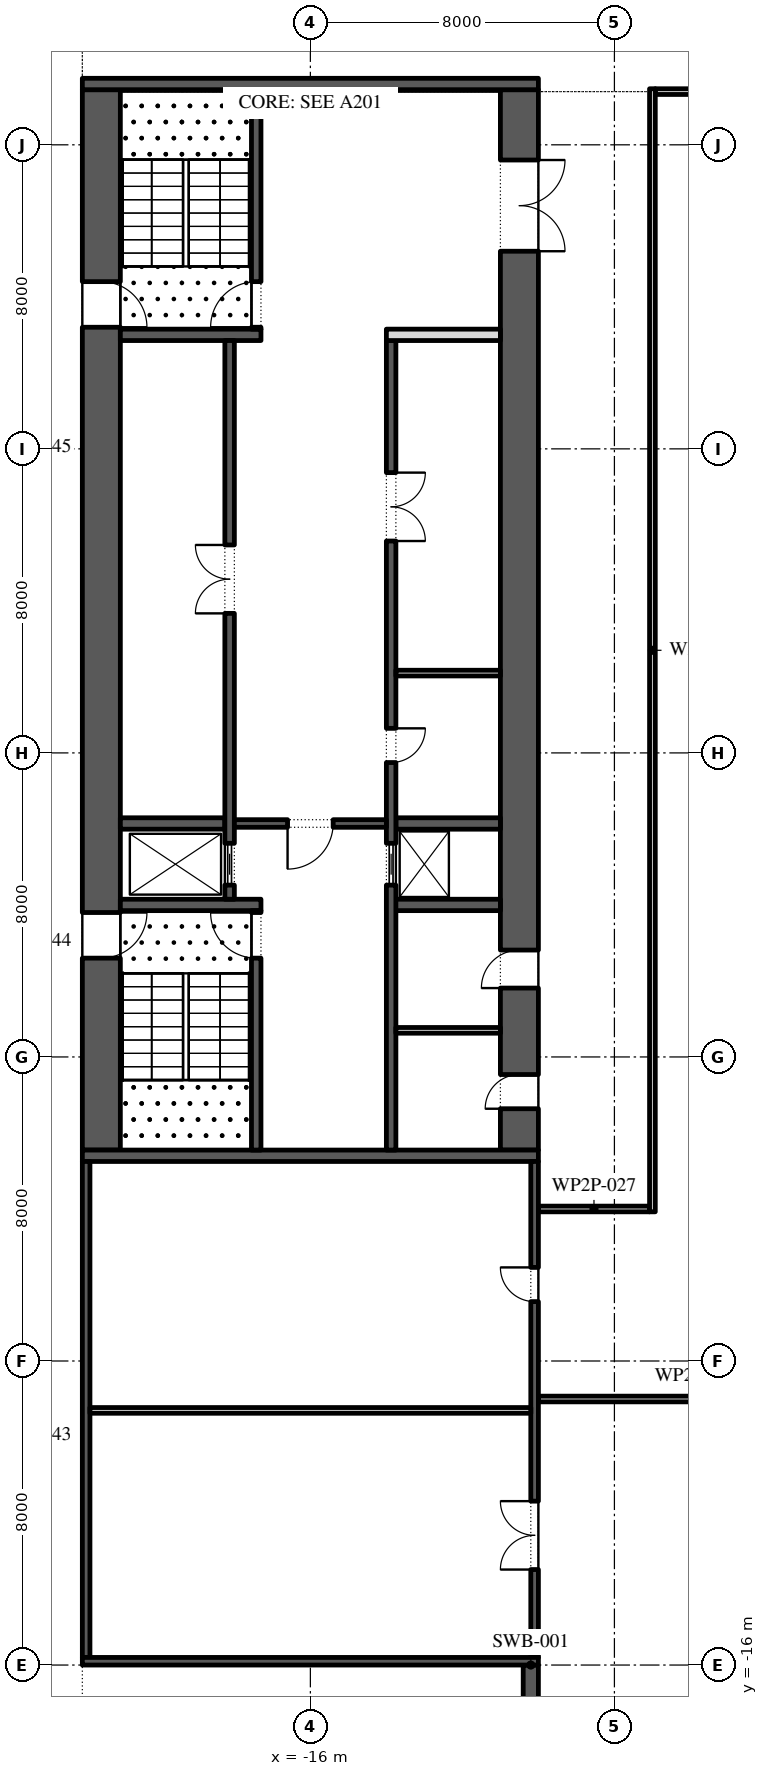
"""IFC4 building model, lengths in metres.
Left out: names, types, materials, properties, quantities, classifications, styles, units other than length and angle.
Written with IfcOpenShell. Run it as: python <this file> out.ifc"""

import sys

from ifc_helpers import new_model, si_unit, direction, frame, frame_2d, origin, place, context, subcontext, project, spatial, rectangle, extrude, element, fill, save


model = new_model("IFC4")
c1 = context("Model", 3, precision=1e-05, world=origin(), true_north=direction((0.0, 1.0)))
c2 = subcontext(c1, "Body", "Model", "MODEL_VIEW")
j1 = project(units=[si_unit("LENGTHUNIT", "METRE"), si_unit("PLANEANGLEUNIT", "RADIAN")], contexts=[c1])
p1 = place(None, origin())
s1 = spatial("IfcSite", under=j1, at=p1, CompositionType="ELEMENT")
p2 = place(p1, origin())
s2 = spatial("IfcBuilding", under=s1, at=p2, CompositionType="ELEMENT")
p3 = place(p2, frame((0.0, 0.0, -10.4)))
s3 = spatial("IfcBuildingStorey", under=s2, at=p3, CompositionType="ELEMENT", Elevation=-10.4)
p4 = place(p3, frame((-10.2, -31.0, -0.3), z_axis=(0.0, 0.0, 1.0), x_axis=(0.0, 1.0, 0.0)))
e1 = element("IfcWall", 1, at=p4, inside=s3, PredefinedType="SHEAR", context=c2, shape_type="SweptSolid", body=[
    extrude(rectangle(XDim=15.0, YDim=0.4, at=frame_2d((7.5, 0.0))), origin(), (0.0, 0.0, 1.0), 5.2),
])
p5 = place(p3, frame((-21.5, -2.45, 0.0), z_axis=(0.0, 0.0, 1.0), x_axis=(0.0, 1.0, 0.0)))
e2 = element("IfcWall", 2, at=p5, inside=s3, PredefinedType="SHEAR", context=c2, shape_type="SweptSolid", body=[
    extrude(rectangle(XDim=27.9, YDim=1.0, at=frame_2d((13.95, 0.0))), origin(), (0.0, 0.0, 1.0), 4.9),
])
p6 = place(p5, frame((5.05, 0.0, 0.0)))
e3 = element("IfcOpeningElement", 3, at=p6, cuts=e2, PredefinedType="OPENING", context=c2, shape_type="SweptSolid", body=[
    extrude(rectangle(XDim=1.2, YDim=2.1, at=frame_2d((0.6, 1.05))), frame((0.0, 0.51, 0.0), z_axis=(0.0, -1.0, 0.0), x_axis=(1.0, 0.0, 0.0)), (0.0, 0.0, 1.0), 1.02),
])
p7 = place(p5, frame((21.65, 0.0, 0.0)))
e4 = element("IfcOpeningElement", 4, at=p7, cuts=e2, PredefinedType="OPENING", context=c2, shape_type="SweptSolid", body=[
    extrude(rectangle(XDim=1.2, YDim=2.1, at=frame_2d((0.6, 1.05))), frame((0.0, 0.51, 0.0), z_axis=(0.0, -1.0, 0.0), x_axis=(1.0, 0.0, 0.0)), (0.0, 0.0, 1.0), 1.02),
])
p8 = place(p3, frame((-10.5, -2.45, 0.0), z_axis=(0.0, 0.0, 1.0), x_axis=(0.0, 1.0, 0.0)))
e5 = element("IfcWall", 5, at=p8, inside=s3, PredefinedType="SHEAR", context=c2, shape_type="SweptSolid", body=[
    extrude(rectangle(XDim=27.9, YDim=1.0, at=frame_2d((13.95, 0.0))), origin(), (0.0, 0.0, 1.0), 4.9),
])
p9 = place(p8, frame((23.65, 0.0, 0.0)))
e6 = element("IfcOpeningElement", 6, at=p9, cuts=e5, PredefinedType="OPENING", context=c2, shape_type="SweptSolid", body=[
    extrude(rectangle(XDim=2.4, YDim=2.1, at=frame_2d((1.2, 1.05))), frame((0.0, 0.51, 0.0), z_axis=(0.0, -1.0, 0.0), x_axis=(1.0, 0.0, 0.0)), (0.0, 0.0, 1.0), 1.02),
])
p10 = place(p8, frame((1.087, 0.0, 0.0)))
e7 = element("IfcOpeningElement", 7, at=p10, cuts=e5, PredefinedType="OPENING", context=c2, shape_type="SweptSolid", body=[
    extrude(rectangle(XDim=0.9, YDim=2.1, at=frame_2d((0.45, 1.05))), frame((0.0, 0.51, 0.0), z_axis=(0.0, -1.0, 0.0), x_axis=(1.0, 0.0, 0.0)), (0.0, 0.0, 1.0), 1.02),
])
p11 = place(p8, frame((4.262, 0.0, 0.0)))
e8 = element("IfcOpeningElement", 8, at=p11, cuts=e5, PredefinedType="OPENING", context=c2, shape_type="SweptSolid", body=[
    extrude(rectangle(XDim=1.0, YDim=2.1, at=frame_2d((0.5, 1.05))), frame((0.0, 0.51, 0.0), z_axis=(0.0, -1.0, 0.0), x_axis=(1.0, 0.0, 0.0)), (0.0, 0.0, 1.0), 1.02),
])
for number, where, z_axis, x_axis in (
    (9, (-22.0, -2.6, 0.0), (0.0, 0.0, 1.0), (1.0, 0.0, 0.0)),
    (10, (-22.0, 25.6, 0.0), (0.0, 0.0, 1.0), (1.0, 0.0, 0.0)),
):
    element("IfcWall", number, at=place(p3, frame(where, z_axis=z_axis, x_axis=x_axis)), inside=s3, PredefinedType="SHEAR", context=c2, shape_type="SweptSolid", body=[
        extrude(rectangle(XDim=12.0, YDim=0.3, at=frame_2d((6.0, 0.0))), origin(), (0.0, 0.0, 1.0), 4.9),
    ])
p12 = place(p3, frame((-21.0, 4.0, 0.0), z_axis=(0.0, 0.0, 1.0), x_axis=(1.0, 0.0, 0.0)))
e11 = element("IfcWall", 11, at=p12, inside=s3, PredefinedType="SHEAR", context=c2, shape_type="SweptSolid", body=[
    extrude(rectangle(XDim=3.7, YDim=0.3, at=frame_2d((1.85, 0.0))), origin(), (0.0, 0.0, 1.0), 4.9),
])
p13 = place(p3, frame((-17.425, -2.45, 0.0), z_axis=(0.0, 0.0, 1.0), x_axis=(0.0, 1.0, 0.0)))
e12 = element("IfcWall", 12, at=p13, inside=s3, PredefinedType="SHEAR", context=c2, shape_type="SweptSolid", body=[
    extrude(rectangle(XDim=6.3, YDim=0.25, at=frame_2d((3.15, 0.0))), origin(), (0.0, 0.0, 1.0), 4.9),
])
p14 = place(p13, frame((5.05, 0.0, 0.0)))
e13 = element("IfcOpeningElement", 13, at=p14, cuts=e12, PredefinedType="OPENING", context=c2, shape_type="SweptSolid", body=[
    extrude(rectangle(XDim=1.2, YDim=2.1, at=frame_2d((0.6, 1.05))), frame((0.0, 0.135, 0.0), z_axis=(0.0, -1.0, 0.0), x_axis=(1.0, 0.0, 0.0)), (0.0, 0.0, 1.0), 0.27),
])
p15 = place(p3, frame((-21.0, 19.0, 0.0), z_axis=(0.0, 0.0, 1.0), x_axis=(1.0, 0.0, 0.0)))
e14 = element("IfcWall", 14, at=p15, inside=s3, PredefinedType="SHEAR", context=c2, shape_type="SweptSolid", body=[
    extrude(rectangle(XDim=3.7, YDim=0.3, at=frame_2d((1.85, 0.0))), origin(), (0.0, 0.0, 1.0), 4.9),
])
p16 = place(p3, frame((-17.425, 19.15, 0.0), z_axis=(0.0, 0.0, 1.0), x_axis=(0.0, 1.0, 0.0)))
e15 = element("IfcWall", 15, at=p16, inside=s3, PredefinedType="SHEAR", context=c2, shape_type="SweptSolid", body=[
    extrude(rectangle(XDim=6.3, YDim=0.25, at=frame_2d((3.15, 0.0))), origin(), (0.0, 0.0, 1.0), 4.9),
])
p17 = place(p16, frame((0.05, 0.0, 0.0)))
e16 = element("IfcOpeningElement", 16, at=p17, cuts=e15, PredefinedType="OPENING", context=c2, shape_type="SweptSolid", body=[
    extrude(rectangle(XDim=1.2, YDim=2.1, at=frame_2d((0.6, 1.05))), frame((0.0, 0.135, 0.0), z_axis=(0.0, -1.0, 0.0), x_axis=(1.0, 0.0, 0.0)), (0.0, 0.0, 1.0), 0.27),
])
p18 = place(p3, frame((-21.0, 6.143, 0.0), z_axis=(0.0, 0.0, 1.0), x_axis=(1.0, 0.0, 0.0)))
e17 = element("IfcWall", 17, at=p18, inside=s3, PredefinedType="SHEAR", context=c2, shape_type="SweptSolid", body=[
    extrude(rectangle(XDim=2.75, YDim=0.3, at=frame_2d((1.375, 0.0))), origin(), (0.0, 0.0, 1.0), 4.9),
])
p19 = place(p3, frame((-18.125, 4.15, 0.0), z_axis=(0.0, 0.0, 1.0), x_axis=(0.0, 1.0, 0.0)))
e18 = element("IfcWall", 18, at=p19, inside=s3, PredefinedType="SHEAR", context=c2, shape_type="SweptSolid", body=[
    extrude(rectangle(XDim=14.7, YDim=0.25, at=frame_2d((7.35, 0.0))), origin(), (0.0, 0.0, 1.0), 4.9),
])
p20 = place(p19, frame((7.521, 0.0, 0.0)))
e19 = element("IfcOpeningElement", 19, at=p20, cuts=e18, PredefinedType="OPENING", context=c2, shape_type="SweptSolid", body=[
    extrude(rectangle(XDim=1.8, YDim=2.4, at=frame_2d((0.9, 1.2))), frame((0.0, 0.135, 0.0), z_axis=(0.0, -1.0, 0.0), x_axis=(1.0, 0.0, 0.0)), (0.0, 0.0, 1.0), 0.27),
])
p21 = place(p19, frame((0.371, 0.0, 0.0)))
e20 = element("IfcOpeningElement", 20, at=p21, cuts=e18, PredefinedType="OPENING", context=c2, shape_type="SweptSolid", body=[
    extrude(rectangle(XDim=1.1, YDim=2.1, at=frame_2d((0.55, 1.05))), frame((0.0, 0.135, 0.0), z_axis=(0.0, -1.0, 0.0), x_axis=(1.0, 0.0, 0.0)), (0.0, 0.0, 1.0), 0.27),
])
p22 = place(p3, frame((-14.0, 4.0, 0.0), z_axis=(0.0, 0.0, 1.0), x_axis=(1.0, 0.0, 0.0)))
e21 = element("IfcWall", 21, at=p22, inside=s3, PredefinedType="SHEAR", context=c2, shape_type="SweptSolid", body=[
    extrude(rectangle(XDim=3.0, YDim=0.3, at=frame_2d((1.5, 0.0))), origin(), (0.0, 0.0, 1.0), 4.9),
])
p23 = place(p3, frame((-13.75, 6.143, 0.0), z_axis=(0.0, 0.0, 1.0), x_axis=(1.0, 0.0, 0.0)))
e22 = element("IfcWall", 22, at=p23, inside=s3, PredefinedType="SHEAR", context=c2, shape_type="SweptSolid", body=[
    extrude(rectangle(XDim=2.75, YDim=0.3, at=frame_2d((1.375, 0.0))), origin(), (0.0, 0.0, 1.0), 4.9),
])
p24 = place(p3, frame((-13.875, -2.45, 0.0), z_axis=(0.0, 0.0, 1.0), x_axis=(0.0, 1.0, 0.0)))
e23 = element("IfcWall", 23, at=p24, inside=s3, PredefinedType="SHEAR", context=c2, shape_type="SweptSolid", body=[
    extrude(rectangle(XDim=21.3, YDim=0.25, at=frame_2d((10.65, 0.0))), origin(), (0.0, 0.0, 1.0), 4.9),
])
p25 = place(p24, frame((10.196, 0.0, 0.0)))
e24 = element("IfcOpeningElement", 24, at=p25, cuts=e23, PredefinedType="OPENING", context=c2, shape_type="SweptSolid", body=[
    extrude(rectangle(XDim=0.9, YDim=2.1, at=frame_2d((0.45, 1.05))), frame((0.0, 0.135, 0.0), z_axis=(0.0, -1.0, 0.0), x_axis=(1.0, 0.0, 0.0)), (0.0, 0.0, 1.0), 0.27),
])
p26 = place(p24, frame((16.025, 0.0, 0.0)))
e25 = element("IfcOpeningElement", 25, at=p26, cuts=e23, PredefinedType="OPENING", context=c2, shape_type="SweptSolid", body=[
    extrude(rectangle(XDim=1.8, YDim=2.4, at=frame_2d((0.9, 1.2))), frame((0.0, 0.135, 0.0), z_axis=(0.0, -1.0, 0.0), x_axis=(1.0, 0.0, 0.0)), (0.0, 0.0, 1.0), 0.27),
])
p27 = place(p24, frame((6.971, 0.0, 0.0)))
e26 = element("IfcOpeningElement", 26, at=p27, cuts=e23, PredefinedType="OPENING", context=c2, shape_type="SweptSolid", body=[
    extrude(rectangle(XDim=1.1, YDim=2.1, at=frame_2d((0.55, 1.05))), frame((0.0, 0.135, 0.0), z_axis=(0.0, -1.0, 0.0), x_axis=(1.0, 0.0, 0.0)), (0.0, 0.0, 1.0), 0.27),
])
p28 = place(p3, frame((-14.0, 19.0, 0.0), z_axis=(0.0, 0.0, 1.0), x_axis=(1.0, 0.0, 0.0)))
e27 = element("IfcWall", 27, at=p28, inside=s3, PredefinedType="PARTITIONING", context=c2, shape_type="SweptSolid", body=[
    extrude(rectangle(XDim=3.0, YDim=0.3, at=frame_2d((1.5, 0.0))), origin(), (0.0, 0.0, 1.0), 4.9),
])
p29 = place(p3, frame((-13.75, 10.1, 0.0), z_axis=(0.0, 0.0, 1.0), x_axis=(1.0, 0.0, 0.0)))
e28 = element("IfcWall", 28, at=p29, inside=s3, PredefinedType="PARTITIONING", context=c2, shape_type="SweptSolid", body=[
    extrude(rectangle(XDim=2.75, YDim=0.15, at=frame_2d((1.375, 0.0))), origin(), (0.0, 0.0, 1.0), 4.9),
])
p30 = place(p3, frame((-18.0, 6.143, 0.0), z_axis=(0.0, 0.0, 1.0), x_axis=(1.0, 0.0, 0.0)))
e29 = element("IfcWall", 29, at=p30, inside=s3, PredefinedType="SHEAR", context=c2, shape_type="SweptSolid", body=[
    extrude(rectangle(XDim=4.0, YDim=0.2, at=frame_2d((2.0, 0.0))), origin(), (0.0, 0.0, 1.0), 4.9),
])
p31 = place(p30, frame((1.4, 0.0, 0.0)))
e30 = element("IfcOpeningElement", 30, at=p31, cuts=e29, PredefinedType="OPENING", context=c2, shape_type="SweptSolid", body=[
    extrude(rectangle(XDim=1.2, YDim=2.1, at=frame_2d((0.6, 1.05))), frame((0.0, 0.11, 0.0), z_axis=(0.0, -1.0, 0.0), x_axis=(1.0, 0.0, 0.0)), (0.0, 0.0, 1.0), 0.22),
])
p32 = place(p3, frame((-13.75, 0.7, 0.0), z_axis=(0.0, 0.0, 1.0), x_axis=(1.0, 0.0, 0.0)))
e31 = element("IfcWall", 31, at=p32, inside=s3, PredefinedType="PARTITIONING", context=c2, shape_type="SweptSolid", body=[
    extrude(rectangle(XDim=2.75, YDim=0.15, at=frame_2d((1.375, 0.0))), origin(), (0.0, 0.0, 1.0), 4.9),
])
p33 = place(p3, frame((-21.9, -15.8, 0.0), z_axis=(0.0, 0.0, 1.0), x_axis=(0.0, 1.0, 0.0)))
e32 = element("IfcWall", 32, at=p33, inside=s3, PredefinedType="SHEAR", context=c2, shape_type="SweptSolid", body=[
    extrude(rectangle(XDim=13.05, YDim=0.2, at=frame_2d((6.525, 0.0))), origin(), (0.0, 0.0, 1.0), 4.9),
])
p34 = place(p3, frame((-10.1, -15.8, 0.0), z_axis=(0.0, 0.0, 1.0), x_axis=(0.0, 1.0, 0.0)))
e33 = element("IfcWall", 33, at=p34, inside=s3, PredefinedType="SHEAR", context=c2, shape_type="SweptSolid", body=[
    extrude(rectangle(XDim=13.05, YDim=0.2, at=frame_2d((6.525, 0.0))), origin(), (0.0, 0.0, 1.0), 4.9),
])
p35 = place(p34, frame((2.312, 0.0, 0.0)))
e34 = element("IfcOpeningElement", 34, at=p35, cuts=e33, PredefinedType="OPENING", context=c2, shape_type="SweptSolid", body=[
    extrude(rectangle(XDim=1.8, YDim=2.4, at=frame_2d((0.9, 1.2))), frame((0.0, 0.11, 0.0), z_axis=(0.0, -1.0, 0.0), x_axis=(1.0, 0.0, 0.0)), (0.0, 0.0, 1.0), 0.22),
])
p36 = place(p34, frame((9.363, 0.0, 0.0)))
e35 = element("IfcOpeningElement", 35, at=p36, cuts=e33, PredefinedType="OPENING", context=c2, shape_type="SweptSolid", body=[
    extrude(rectangle(XDim=0.9, YDim=2.1, at=frame_2d((0.45, 1.05))), frame((0.0, 0.11, 0.0), z_axis=(0.0, -1.0, 0.0), x_axis=(1.0, 0.0, 0.0)), (0.0, 0.0, 1.0), 0.22),
])
p37 = place(p3, frame((-22.0, -15.9, 0.0), z_axis=(0.0, 0.0, 1.0), x_axis=(1.0, 0.0, 0.0)))
e36 = element("IfcWall", 36, at=p37, inside=s3, PredefinedType="SHEAR", context=c2, shape_type="SweptSolid", body=[
    extrude(rectangle(XDim=12.0, YDim=0.2, at=frame_2d((6.0, 0.0))), origin(), (0.0, 0.0, 1.0), 4.9),
])
p38 = place(p3, frame((-21.8, -9.3, 0.0), z_axis=(0.0, 0.0, 1.0), x_axis=(1.0, 0.0, 0.0)))
e37 = element("IfcWall", 37, at=p38, inside=s3, PredefinedType="PARTITIONING", context=c2, shape_type="SweptSolid", body=[
    extrude(rectangle(XDim=11.6, YDim=0.15, at=frame_2d((5.8, 0.0))), origin(), (0.0, 0.0, 1.0), 4.9),
])
p39 = place(p3, frame((-10.0, -9.0, 0.0), z_axis=(0.0, 0.0, 1.0), x_axis=(1.0, 0.0, 0.0)))
e38 = element("IfcWall", 38, at=p39, inside=s3, PredefinedType="PARTITIONING", context=c2, shape_type="SweptSolid", body=[
    extrude(rectangle(XDim=8.425, YDim=0.15, at=frame_2d((4.212, 0.0))), origin(), (0.0, 0.0, 1.0), 4.9),
])
p40 = place(p3, frame((-10.0, -4.0, 0.0), z_axis=(0.0, 0.0, 1.0), x_axis=(1.0, 0.0, 0.0)))
e39 = element("IfcWall", 39, at=p40, inside=s3, PredefinedType="PARTITIONING", context=c2, shape_type="SweptSolid", body=[
    extrude(rectangle(XDim=2.925, YDim=0.15, at=frame_2d((1.462, 0.0))), origin(), (0.0, 0.0, 1.0), 3.93),
])
p41 = place(p3, frame((-6.925, 25.4, 0.0), z_axis=(0.0, 0.0, 1.0), x_axis=(1.0, 0.0, 0.0)))
e40 = element("IfcWall", 40, at=p41, inside=s3, PredefinedType="PARTITIONING", context=c2, shape_type="SweptSolid", body=[
    extrude(rectangle(XDim=5.35, YDim=0.15, at=frame_2d((2.675, 0.0))), origin(), (0.0, 0.0, 1.0), 4.9),
])
p42 = place(p3, frame((-7.0, -4.075, 0.0), z_axis=(0.0, 0.0, 1.0), x_axis=(0.0, 1.0, 0.0)))
e41 = element("IfcWall", 41, at=p42, inside=s3, PredefinedType="PARTITIONING", context=c2, shape_type="SweptSolid", body=[
    extrude(rectangle(XDim=29.55, YDim=0.15, at=frame_2d((14.775, 0.0))), origin(), (0.0, 0.0, 1.0), 4.9),
])
p43 = place(p20, origin())
e42 = element("IfcDoor", 42, at=p43, inside=s3, OperationType="DOUBLE_DOOR_SINGLE_SWING", PredefinedType="DOOR", context=c2, shape_type="SweptSolid", body=[
    extrude(rectangle(XDim=1.8, YDim=2.4, at=frame_2d((0.9, 1.2))), frame((0.0, 0.125, 0.0), z_axis=(0.0, -1.0, 0.0), x_axis=(1.0, 0.0, 0.0)), (0.0, 0.0, 1.0), 0.05),
])
fill(e19, e42)
p44 = place(p21, origin())
e43 = element("IfcDoor", 43, at=p44, inside=s3, OperationType="SLIDING_TO_LEFT", PredefinedType="DOOR", context=c2, shape_type="SweptSolid", body=[
    extrude(rectangle(XDim=1.1, YDim=2.1, at=frame_2d((0.55, 1.05))), frame((0.0, 0.025, 0.0), z_axis=(0.0, -1.0, 0.0), x_axis=(1.0, 0.0, 0.0)), (0.0, 0.0, 1.0), 0.05),
])
fill(e20, e43)
p45 = place(p25, frame((0.9, -0.2, 0.0), z_axis=(0.0, 0.0, 1.0), x_axis=(-1.0, 0.0, 0.0)))
e44 = element("IfcDoor", 44, at=p45, inside=s3, OperationType="SINGLE_SWING_RIGHT", PredefinedType="DOOR", context=c2, shape_type="SweptSolid", body=[
    extrude(rectangle(XDim=0.9, YDim=2.1, at=frame_2d((0.45, 1.05))), frame((0.0, -0.075, 0.0), z_axis=(0.0, -1.0, 0.0), x_axis=(1.0, 0.0, 0.0)), (0.0, 0.0, 1.0), 0.05),
])
fill(e24, e44)
p46 = place(p26, frame((1.8, -0.2, 0.0), z_axis=(0.0, 0.0, 1.0), x_axis=(-1.0, 0.0, 0.0)))
e45 = element("IfcDoor", 45, at=p46, inside=s3, OperationType="DOUBLE_DOOR_SINGLE_SWING", PredefinedType="DOOR", context=c2, shape_type="SweptSolid", body=[
    extrude(rectangle(XDim=1.8, YDim=2.4, at=frame_2d((0.9, 1.2))), frame((0.0, -0.075, 0.0), z_axis=(0.0, -1.0, 0.0), x_axis=(1.0, 0.0, 0.0)), (0.0, 0.0, 1.0), 0.05),
])
fill(e25, e45)
p47 = place(p27, origin())
e46 = element("IfcDoor", 46, at=p47, inside=s3, OperationType="SLIDING_TO_LEFT", PredefinedType="DOOR", context=c2, shape_type="SweptSolid", body=[
    extrude(rectangle(XDim=1.1, YDim=2.1, at=frame_2d((0.55, 1.05))), frame((0.0, 0.025, 0.0), z_axis=(0.0, -1.0, 0.0), x_axis=(1.0, 0.0, 0.0)), (0.0, 0.0, 1.0), 0.05),
])
fill(e26, e46)
p48 = place(p31, frame((1.2, 0.0, 0.0), z_axis=(0.0, 0.0, 1.0), x_axis=(-1.0, 0.0, 0.0)))
e47 = element("IfcDoor", 47, at=p48, inside=s3, OperationType="SINGLE_SWING_LEFT", PredefinedType="DOOR", context=c2, shape_type="SweptSolid", body=[
    extrude(rectangle(XDim=1.2, YDim=2.1, at=frame_2d((0.6, 1.05))), frame((0.0, 0.025, 0.0), z_axis=(0.0, -1.0, 0.0), x_axis=(1.0, 0.0, 0.0)), (0.0, 0.0, 1.0), 0.05),
])
fill(e30, e47)
p49 = place(p9, frame((2.4, 0.0, 0.0), z_axis=(0.0, 0.0, 1.0), x_axis=(-1.0, 0.0, 0.0)))
e48 = element("IfcDoor", 48, at=p49, inside=s3, OperationType="DOUBLE_DOOR_SINGLE_SWING", PredefinedType="DOOR", context=c2, shape_type="SweptSolid", body=[
    extrude(rectangle(XDim=2.4, YDim=2.1, at=frame_2d((1.2, 1.05))), frame((0.0, 0.025, 0.0), z_axis=(0.0, -1.0, 0.0), x_axis=(1.0, 0.0, 0.0)), (0.0, 0.0, 1.0), 0.05),
])
fill(e6, e48)
p50 = place(p14, origin())
e49 = element("IfcDoor", 49, at=p50, inside=s3, OperationType="SINGLE_SWING_LEFT", PredefinedType="DOOR", context=c2, shape_type="SweptSolid", body=[
    extrude(rectangle(XDim=1.2, YDim=2.1, at=frame_2d((0.6, 1.05))), frame((0.0, 0.025, 0.0), z_axis=(0.0, -1.0, 0.0), x_axis=(1.0, 0.0, 0.0)), (0.0, 0.0, 1.0), 0.05),
])
fill(e13, e49)
p51 = place(p6, frame((1.2, 0.0, 0.0), z_axis=(0.0, 0.0, 1.0), x_axis=(-1.0, 0.0, 0.0)))
e50 = element("IfcDoor", 50, at=p51, inside=s3, OperationType="SINGLE_SWING_RIGHT", PredefinedType="DOOR", context=c2, shape_type="SweptSolid", body=[
    extrude(rectangle(XDim=1.2, YDim=2.1, at=frame_2d((0.6, 1.05))), frame((0.0, 0.025, 0.0), z_axis=(0.0, -1.0, 0.0), x_axis=(1.0, 0.0, 0.0)), (0.0, 0.0, 1.0), 0.05),
])
fill(e3, e50)
p52 = place(p17, origin())
e51 = element("IfcDoor", 51, at=p52, inside=s3, OperationType="SINGLE_SWING_RIGHT", PredefinedType="DOOR", context=c2, shape_type="SweptSolid", body=[
    extrude(rectangle(XDim=1.2, YDim=2.1, at=frame_2d((0.6, 1.05))), frame((0.0, 0.025, 0.0), z_axis=(0.0, -1.0, 0.0), x_axis=(1.0, 0.0, 0.0)), (0.0, 0.0, 1.0), 0.05),
])
fill(e16, e51)
p53 = place(p7, frame((1.2, 0.0, 0.0), z_axis=(0.0, 0.0, 1.0), x_axis=(-1.0, 0.0, 0.0)))
e52 = element("IfcDoor", 52, at=p53, inside=s3, OperationType="SINGLE_SWING_LEFT", PredefinedType="DOOR", context=c2, shape_type="SweptSolid", body=[
    extrude(rectangle(XDim=1.2, YDim=2.1, at=frame_2d((0.6, 1.05))), frame((0.0, 0.025, 0.0), z_axis=(0.0, -1.0, 0.0), x_axis=(1.0, 0.0, 0.0)), (0.0, 0.0, 1.0), 0.05),
])
fill(e4, e52)
p54 = place(p10, origin())
e53 = element("IfcDoor", 53, at=p54, inside=s3, OperationType="SINGLE_SWING_RIGHT", PredefinedType="DOOR", context=c2, shape_type="SweptSolid", body=[
    extrude(rectangle(XDim=0.9, YDim=2.1, at=frame_2d((0.45, 1.05))), frame((0.0, 0.5, 0.0), z_axis=(0.0, -1.0, 0.0), x_axis=(1.0, 0.0, 0.0)), (0.0, 0.0, 1.0), 0.05),
])
fill(e7, e53)
p55 = place(p11, origin())
e54 = element("IfcDoor", 54, at=p55, inside=s3, OperationType="SINGLE_SWING_RIGHT", PredefinedType="DOOR", context=c2, shape_type="SweptSolid", body=[
    extrude(rectangle(XDim=1.0, YDim=2.1, at=frame_2d((0.5, 1.05))), frame((0.0, 0.5, 0.0), z_axis=(0.0, -1.0, 0.0), x_axis=(1.0, 0.0, 0.0)), (0.0, 0.0, 1.0), 0.05),
])
fill(e8, e54)
p56 = place(p35, origin())
e55 = element("IfcDoor", 55, at=p56, inside=s3, OperationType="DOUBLE_DOOR_SINGLE_SWING", PredefinedType="DOOR", context=c2, shape_type="SweptSolid", body=[
    extrude(rectangle(XDim=1.8, YDim=2.4, at=frame_2d((0.9, 1.2))), frame((0.0, 0.1, 0.0), z_axis=(0.0, -1.0, 0.0), x_axis=(1.0, 0.0, 0.0)), (0.0, 0.0, 1.0), 0.05),
])
fill(e34, e55)
p57 = place(p36, origin())
e56 = element("IfcDoor", 56, at=p57, inside=s3, OperationType="SINGLE_SWING_LEFT", PredefinedType="DOOR", context=c2, shape_type="SweptSolid", body=[
    extrude(rectangle(XDim=0.9, YDim=2.1, at=frame_2d((0.45, 1.05))), frame((0.0, 0.1, 0.0), z_axis=(0.0, -1.0, 0.0), x_axis=(1.0, 0.0, 0.0)), (0.0, 0.0, 1.0), 0.05),
])
fill(e35, e56)
save(model, sys.argv[1])
